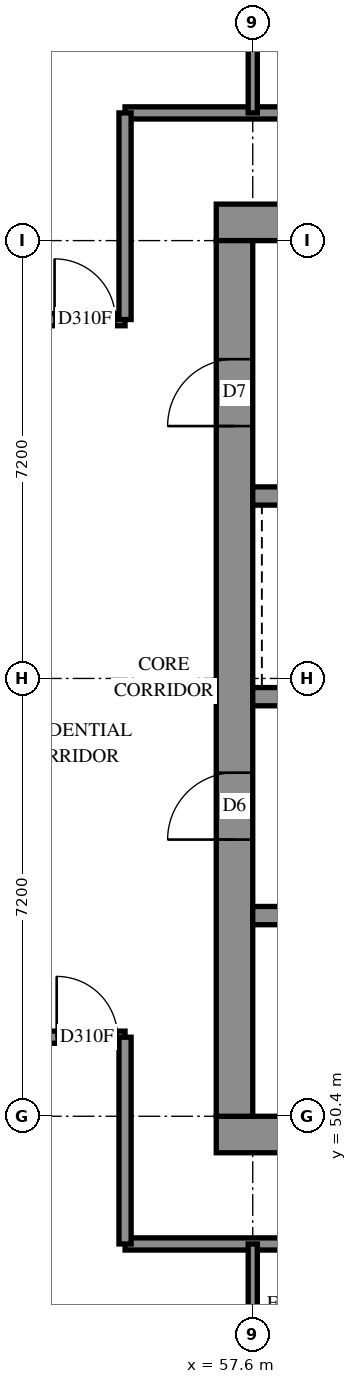
"""IFC4 building model, lengths in metres.
Left out: names, types, materials, properties, quantities, classifications, styles, units other than length and angle.
Written with IfcOpenShell. Run it as: python <this file> out.ifc"""

import sys

from ifc_helpers import new_model, si_unit, direction, frame, frame_2d, origin, place, context, subcontext, project, spatial, rectangle, extrude, element, fill, save


model = new_model("IFC4")
c1 = context("Model", 3, precision=1e-05, world=origin(), true_north=direction((0.0, 1.0)))
c2 = subcontext(c1, "Body", "Model", "MODEL_VIEW")
j1 = project(units=[si_unit("LENGTHUNIT", "METRE"), si_unit("PLANEANGLEUNIT", "RADIAN")], contexts=[c1])
p1 = place(None, origin())
s1 = spatial("IfcSite", under=j1, at=p1, CompositionType="ELEMENT")
p2 = place(p1, origin())
s2 = spatial("IfcBuilding", under=s1, at=p2, CompositionType="ELEMENT")
p3 = place(p2, frame((0.0, 0.0, 149.0)))
s3 = spatial("IfcBuildingStorey", under=s2, at=p3, CompositionType="ELEMENT", Elevation=149.0)
p4 = place(p3, frame((57.0, 50.1, -0.3), z_axis=(0.0, 0.0, 1.0), x_axis=(1.0, 0.0, 0.0)))
e1 = element("IfcWall", 1, at=p4, inside=s3, PredefinedType="SHEAR", context=c2, shape_type="SweptSolid", body=[
    extrude(rectangle(XDim=15.6, YDim=0.6, at=frame_2d((7.8, 0.0))), origin(), (0.0, 0.0, 1.0), 2.7),
])
p5 = place(p3, frame((57.0, 65.1, -0.3), z_axis=(0.0, 0.0, 1.0), x_axis=(1.0, 0.0, 0.0)))
e2 = element("IfcWall", 2, at=p5, inside=s3, PredefinedType="SHEAR", context=c2, shape_type="SweptSolid", body=[
    extrude(rectangle(XDim=15.6, YDim=0.6, at=frame_2d((7.8, 0.0))), origin(), (0.0, 0.0, 1.0), 2.7),
])
p6 = place(p5, frame((10.6, 0.0, 0.3)))
e3 = element("IfcOpeningElement", 3, at=p6, cuts=e2, PredefinedType="OPENING", context=c2, shape_type="SweptSolid", body=[
    extrude(rectangle(XDim=0.8, YDim=2.1, at=frame_2d((0.4, 1.05))), frame((0.0, 0.31, 0.0), z_axis=(0.0, -1.0, 0.0), x_axis=(1.0, 0.0, 0.0)), (0.0, 0.0, 1.0), 0.62),
])
p7 = place(p3, frame((57.3, 50.4, -0.3), z_axis=(0.0, 0.0, 1.0), x_axis=(0.0, 1.0, 0.0)))
e4 = element("IfcWall", 4, at=p7, inside=s3, PredefinedType="SHEAR", context=c2, shape_type="SweptSolid", body=[
    extrude(rectangle(XDim=14.4, YDim=0.6, at=frame_2d((7.2, 0.0))), origin(), (0.0, 0.0, 1.0), 2.7),
])
p8 = place(p7, frame((4.55, 0.0, 0.3)))
e5 = element("IfcOpeningElement", 5, at=p8, cuts=e4, PredefinedType="OPENING", context=c2, shape_type="SweptSolid", body=[
    extrude(rectangle(XDim=1.1, YDim=2.1, at=frame_2d((0.55, 1.05))), frame((0.0, 0.31, 0.0), z_axis=(0.0, -1.0, 0.0), x_axis=(1.0, 0.0, 0.0)), (0.0, 0.0, 1.0), 0.62),
])
p9 = place(p7, frame((11.35, 0.0, 0.3)))
e6 = element("IfcOpeningElement", 6, at=p9, cuts=e4, PredefinedType="OPENING", context=c2, shape_type="SweptSolid", body=[
    extrude(rectangle(XDim=1.1, YDim=2.1, at=frame_2d((0.55, 1.05))), frame((0.0, 0.31, 0.0), z_axis=(0.0, -1.0, 0.0), x_axis=(1.0, 0.0, 0.0)), (0.0, 0.0, 1.0), 0.62),
])
p10 = place(p3, frame((57.6, 53.7, 0.0), z_axis=(0.0, 0.0, 1.0), x_axis=(1.0, 0.0, 0.0)))
e7 = element("IfcWall", 7, at=p10, inside=s3, PredefinedType="SOLIDWALL", context=c2, shape_type="SweptSolid", body=[
    extrude(rectangle(XDim=14.4, YDim=0.3, at=frame_2d((7.2, 0.0))), origin(), (0.0, 0.0, 1.0), 3.1),
])
p11 = place(p10, frame((1.35, 0.0, 0.0)))
e8 = element("IfcOpeningElement", 8, at=p11, cuts=e7, PredefinedType="OPENING", context=c2, shape_type="SweptSolid", body=[
    extrude(rectangle(XDim=0.9, YDim=2.1, at=frame_2d((0.45, 1.05))), frame((0.0, 0.16, 0.0), z_axis=(0.0, -1.0, 0.0), x_axis=(1.0, 0.0, 0.0)), (0.0, 0.0, 1.0), 0.32),
])
p12 = place(p10, frame((4.95, 0.0, 0.0)))
e9 = element("IfcOpeningElement", 9, at=p12, cuts=e7, PredefinedType="OPENING", context=c2, shape_type="SweptSolid", body=[
    extrude(rectangle(XDim=0.9, YDim=2.1, at=frame_2d((0.45, 1.05))), frame((0.0, 0.16, 0.0), z_axis=(0.0, -1.0, 0.0), x_axis=(1.0, 0.0, 0.0)), (0.0, 0.0, 1.0), 0.32),
])
p13 = place(p10, frame((8.55, 0.0, 0.0)))
e10 = element("IfcOpeningElement", 10, at=p13, cuts=e7, PredefinedType="OPENING", context=c2, shape_type="SweptSolid", body=[
    extrude(rectangle(XDim=0.9, YDim=2.1, at=frame_2d((0.45, 1.05))), frame((0.0, 0.16, 0.0), z_axis=(0.0, -1.0, 0.0), x_axis=(1.0, 0.0, 0.0)), (0.0, 0.0, 1.0), 0.32),
])
p14 = place(p10, frame((12.05, 0.0, 0.0)))
e11 = element("IfcOpeningElement", 11, at=p14, cuts=e7, PredefinedType="OPENING", context=c2, shape_type="SweptSolid", body=[
    extrude(rectangle(XDim=1.1, YDim=2.1, at=frame_2d((0.55, 1.05))), frame((0.0, 0.16, 0.0), z_axis=(0.0, -1.0, 0.0), x_axis=(1.0, 0.0, 0.0)), (0.0, 0.0, 1.0), 0.32),
])
p15 = place(p3, frame((57.6, 57.3, 0.0), z_axis=(0.0, 0.0, 1.0), x_axis=(1.0, 0.0, 0.0)))
e12 = element("IfcWall", 12, at=p15, inside=s3, PredefinedType="SOLIDWALL", context=c2, shape_type="SweptSolid", body=[
    extrude(rectangle(XDim=14.4, YDim=0.3, at=frame_2d((7.2, 0.0))), origin(), (0.0, 0.0, 1.0), 3.1),
])
p16 = place(p15, frame((1.25, 0.0, 0.0)))
e13 = element("IfcOpeningElement", 13, at=p16, cuts=e12, PredefinedType="OPENING", context=c2, shape_type="SweptSolid", body=[
    extrude(rectangle(XDim=1.1, YDim=2.1, at=frame_2d((0.55, 1.05))), frame((0.0, 0.16, 0.0), z_axis=(0.0, -1.0, 0.0), x_axis=(1.0, 0.0, 0.0)), (0.0, 0.0, 1.0), 0.32),
])
p17 = place(p15, frame((4.85, 0.0, 0.0)))
e14 = element("IfcOpeningElement", 14, at=p17, cuts=e12, PredefinedType="OPENING", context=c2, shape_type="SweptSolid", body=[
    extrude(rectangle(XDim=1.1, YDim=2.1, at=frame_2d((0.55, 1.05))), frame((0.0, 0.16, 0.0), z_axis=(0.0, -1.0, 0.0), x_axis=(1.0, 0.0, 0.0)), (0.0, 0.0, 1.0), 0.32),
])
p18 = place(p15, frame((8.45, 0.0, 0.0)))
e15 = element("IfcOpeningElement", 15, at=p18, cuts=e12, PredefinedType="OPENING", context=c2, shape_type="SweptSolid", body=[
    extrude(rectangle(XDim=1.1, YDim=2.1, at=frame_2d((0.55, 1.05))), frame((0.0, 0.16, 0.0), z_axis=(0.0, -1.0, 0.0), x_axis=(1.0, 0.0, 0.0)), (0.0, 0.0, 1.0), 0.32),
])
p19 = place(p15, frame((12.05, 0.0, 0.0)))
e16 = element("IfcOpeningElement", 16, at=p19, cuts=e12, PredefinedType="OPENING", context=c2, shape_type="SweptSolid", body=[
    extrude(rectangle(XDim=1.1, YDim=2.1, at=frame_2d((0.55, 1.05))), frame((0.0, 0.16, 0.0), z_axis=(0.0, -1.0, 0.0), x_axis=(1.0, 0.0, 0.0)), (0.0, 0.0, 1.0), 0.32),
])
p20 = place(p3, frame((57.6, 60.6, 0.0), z_axis=(0.0, 0.0, 1.0), x_axis=(1.0, 0.0, 0.0)))
e17 = element("IfcWall", 17, at=p20, inside=s3, PredefinedType="SOLIDWALL", context=c2, shape_type="SweptSolid", body=[
    extrude(rectangle(XDim=7.2, YDim=0.3, at=frame_2d((3.6, 0.0))), origin(), (0.0, 0.0, 1.0), 3.1),
])
p21 = place(p3, frame((55.5, 48.3, 0.0), z_axis=(0.0, 0.0, 1.0), x_axis=(1.0, 0.0, 0.0)))
e18 = element("IfcWall", 18, at=p21, inside=s3, PredefinedType="PARTITIONING", context=c2, shape_type="SweptSolid", body=[
    extrude(rectangle(XDim=18.974, YDim=0.2, at=frame_2d((9.487, 0.0))), origin(), (0.0, 0.0, 1.0), 3.1),
])
p22 = place(p21, frame((4.4, 0.0, 0.0)))
e19 = element("IfcOpeningElement", 19, at=p22, cuts=e18, PredefinedType="OPENING", context=c2, shape_type="SweptSolid", body=[
    extrude(rectangle(XDim=0.9, YDim=2.1, at=frame_2d((0.45, 1.05))), frame((0.0, 0.11, 0.0), z_axis=(0.0, -1.0, 0.0), x_axis=(1.0, 0.0, 0.0)), (0.0, 0.0, 1.0), 0.22),
])
p23 = place(p21, frame((6.1, 0.0, 0.0)))
e20 = element("IfcOpeningElement", 20, at=p23, cuts=e18, PredefinedType="OPENING", context=c2, shape_type="SweptSolid", body=[
    extrude(rectangle(XDim=0.9, YDim=2.1, at=frame_2d((0.45, 1.05))), frame((0.0, 0.11, 0.0), z_axis=(0.0, -1.0, 0.0), x_axis=(1.0, 0.0, 0.0)), (0.0, 0.0, 1.0), 0.22),
])
p24 = place(p21, frame((13.162, 0.0, 0.0)))
e21 = element("IfcOpeningElement", 21, at=p24, cuts=e18, PredefinedType="OPENING", context=c2, shape_type="SweptSolid", body=[
    extrude(rectangle(XDim=1.0, YDim=2.1, at=frame_2d((0.5, 1.05))), frame((0.0, 0.11, 0.0), z_axis=(0.0, -1.0, 0.0), x_axis=(1.0, 0.0, 0.0)), (0.0, 0.0, 1.0), 0.22),
])
p25 = place(p3, frame((55.5, 66.9, 0.0), z_axis=(0.0, 0.0, 1.0), x_axis=(1.0, 0.0, 0.0)))
e22 = element("IfcWall", 22, at=p25, inside=s3, PredefinedType="PARTITIONING", context=c2, shape_type="SweptSolid", body=[
    extrude(rectangle(XDim=18.6, YDim=0.2, at=frame_2d((9.3, 0.0))), origin(), (0.0, 0.0, 1.0), 3.1),
])
p26 = place(p25, frame((4.4, 0.0, 0.0)))
e23 = element("IfcOpeningElement", 23, at=p26, cuts=e22, PredefinedType="OPENING", context=c2, shape_type="SweptSolid", body=[
    extrude(rectangle(XDim=0.9, YDim=2.1, at=frame_2d((0.45, 1.05))), frame((0.0, 0.11, 0.0), z_axis=(0.0, -1.0, 0.0), x_axis=(1.0, 0.0, 0.0)), (0.0, 0.0, 1.0), 0.22),
])
p27 = place(p25, frame((6.1, 0.0, 0.0)))
e24 = element("IfcOpeningElement", 24, at=p27, cuts=e22, PredefinedType="OPENING", context=c2, shape_type="SweptSolid", body=[
    extrude(rectangle(XDim=0.9, YDim=2.1, at=frame_2d((0.45, 1.05))), frame((0.0, 0.11, 0.0), z_axis=(0.0, -1.0, 0.0), x_axis=(1.0, 0.0, 0.0)), (0.0, 0.0, 1.0), 0.22),
])
p28 = place(p25, frame((11.65, 0.0, 0.0)))
e25 = element("IfcOpeningElement", 25, at=p28, cuts=e22, PredefinedType="OPENING", context=c2, shape_type="SweptSolid", body=[
    extrude(rectangle(XDim=0.9, YDim=2.1, at=frame_2d((0.45, 1.05))), frame((0.0, 0.11, 0.0), z_axis=(0.0, -1.0, 0.0), x_axis=(1.0, 0.0, 0.0)), (0.0, 0.0, 1.0), 0.22),
])
p29 = place(p25, frame((13.3, 0.0, 0.0)))
e26 = element("IfcOpeningElement", 26, at=p29, cuts=e22, PredefinedType="OPENING", context=c2, shape_type="SweptSolid", body=[
    extrude(rectangle(XDim=0.9, YDim=2.1, at=frame_2d((0.45, 1.05))), frame((0.0, 0.11, 0.0), z_axis=(0.0, -1.0, 0.0), x_axis=(1.0, 0.0, 0.0)), (0.0, 0.0, 1.0), 0.22),
])
p30 = place(p3, frame((50.4, 51.7, 0.0), z_axis=(0.0, 0.0, 1.0), x_axis=(1.0, 0.0, 0.0)))
e27 = element("IfcWall", 27, at=p30, inside=s3, PredefinedType="PARTITIONING", context=c2, shape_type="SweptSolid", body=[
    extrude(rectangle(XDim=5.1, YDim=0.2, at=frame_2d((2.55, 0.0))), origin(), (0.0, 0.0, 1.0), 3.1),
])
p31 = place(p30, frame((0.552, 0.0, 0.0)))
e28 = element("IfcOpeningElement", 28, at=p31, cuts=e27, PredefinedType="OPENING", context=c2, shape_type="SweptSolid", body=[
    extrude(rectangle(XDim=0.9, YDim=2.1, at=frame_2d((0.45, 1.05))), frame((0.0, 0.11, 0.0), z_axis=(0.0, -1.0, 0.0), x_axis=(1.0, 0.0, 0.0)), (0.0, 0.0, 1.0), 0.22),
])
p32 = place(p30, frame((3.976, 0.0, 0.0)))
e29 = element("IfcOpeningElement", 29, at=p32, cuts=e27, PredefinedType="OPENING", context=c2, shape_type="SweptSolid", body=[
    extrude(rectangle(XDim=1.0, YDim=2.1, at=frame_2d((0.5, 1.05))), frame((0.0, 0.11, 0.0), z_axis=(0.0, -1.0, 0.0), x_axis=(1.0, 0.0, 0.0)), (0.0, 0.0, 1.0), 0.22),
])
p33 = place(p3, frame((50.4, 63.5, 0.0), z_axis=(0.0, 0.0, 1.0), x_axis=(1.0, 0.0, 0.0)))
e30 = element("IfcWall", 30, at=p33, inside=s3, PredefinedType="PARTITIONING", context=c2, shape_type="SweptSolid", body=[
    extrude(rectangle(XDim=5.1, YDim=0.2, at=frame_2d((2.55, 0.0))), origin(), (0.0, 0.0, 1.0), 3.1),
])
p34 = place(p33, frame((0.552, 0.0, 0.0)))
e31 = element("IfcOpeningElement", 31, at=p34, cuts=e30, PredefinedType="OPENING", context=c2, shape_type="SweptSolid", body=[
    extrude(rectangle(XDim=0.9, YDim=2.1, at=frame_2d((0.45, 1.05))), frame((0.0, 0.11, 0.0), z_axis=(0.0, -1.0, 0.0), x_axis=(1.0, 0.0, 0.0)), (0.0, 0.0, 1.0), 0.22),
])
p35 = place(p33, frame((3.941, 0.0, 0.0)))
e32 = element("IfcOpeningElement", 32, at=p35, cuts=e30, PredefinedType="OPENING", context=c2, shape_type="SweptSolid", body=[
    extrude(rectangle(XDim=1.0, YDim=2.1, at=frame_2d((0.5, 1.05))), frame((0.0, 0.11, 0.0), z_axis=(0.0, -1.0, 0.0), x_axis=(1.0, 0.0, 0.0)), (0.0, 0.0, 1.0), 0.22),
])
p36 = place(p3, frame((55.5, 48.3, 0.0), z_axis=(0.0, 0.0, 1.0), x_axis=(0.0, 1.0, 0.0)))
e33 = element("IfcWall", 33, at=p36, inside=s3, PredefinedType="PARTITIONING", context=c2, shape_type="SweptSolid", body=[
    extrude(rectangle(XDim=3.4, YDim=0.2, at=frame_2d((1.7, 0.0))), origin(), (0.0, 0.0, 1.0), 3.1),
])
p37 = place(p3, frame((55.5, 63.502, 0.0), z_axis=(0.0, 0.0, 1.0), x_axis=(0.0, 1.0, 0.0)))
e34 = element("IfcWall", 34, at=p37, inside=s3, PredefinedType="PARTITIONING", context=c2, shape_type="SweptSolid", body=[
    extrude(rectangle(XDim=3.398, YDim=0.2, at=frame_2d((1.699, 0.0))), origin(), (0.0, 0.0, 1.0), 3.1),
])
for number, where, z_axis, x_axis in (
    (35, (57.6, 45.9, 0.0), (0.0, 0.0, 1.0), (0.0, 1.0, 0.0)),
    (36, (57.6, 66.9, 0.0), (0.0, 0.0, 1.0), (0.0, 1.0, 0.0)),
):
    element("IfcWall", number, at=place(p3, frame(where, z_axis=z_axis, x_axis=x_axis)), inside=s3, PredefinedType="PARTITIONING", context=c2, shape_type="SweptSolid", body=[
        extrude(rectangle(XDim=2.4, YDim=0.15, at=frame_2d((1.2, 0.0))), origin(), (0.0, 0.0, 1.0), 3.1),
    ])
p38 = place(p8, origin())
e37 = element("IfcDoor", 37, at=p38, inside=s3, OperationType="DOUBLE_DOOR_SINGLE_SWING", PredefinedType="DOOR", context=c2, shape_type="SweptSolid", body=[
    extrude(rectangle(XDim=1.1, YDim=2.1, at=frame_2d((0.55, 1.05))), frame((0.0, 0.025, 0.0), z_axis=(0.0, -1.0, 0.0), x_axis=(1.0, 0.0, 0.0)), (0.0, 0.0, 1.0), 0.05),
])
fill(e5, e37)
p39 = place(p9, origin())
e38 = element("IfcDoor", 38, at=p39, inside=s3, OperationType="SINGLE_SWING_LEFT", PredefinedType="DOOR", context=c2, shape_type="SweptSolid", body=[
    extrude(rectangle(XDim=1.1, YDim=2.1, at=frame_2d((0.55, 1.05))), frame((0.0, 0.025, 0.0), z_axis=(0.0, -1.0, 0.0), x_axis=(1.0, 0.0, 0.0)), (0.0, 0.0, 1.0), 0.05),
])
fill(e6, e38)
p40 = place(p35, origin())
e39 = element("IfcDoor", 39, at=p40, inside=s3, OperationType="SINGLE_SWING_LEFT", PredefinedType="DOOR", context=c2, shape_type="SweptSolid", body=[
    extrude(rectangle(XDim=1.0, YDim=2.1, at=frame_2d((0.5, 1.05))), frame((0.0, 0.025, 0.0), z_axis=(0.0, -1.0, 0.0), x_axis=(1.0, 0.0, 0.0)), (0.0, 0.0, 1.0), 0.05),
])
fill(e32, e39)
p41 = place(p32, origin())
e40 = element("IfcDoor", 40, at=p41, inside=s3, OperationType="SINGLE_SWING_RIGHT", PredefinedType="DOOR", context=c2, shape_type="SweptSolid", body=[
    extrude(rectangle(XDim=1.0, YDim=2.1, at=frame_2d((0.5, 1.05))), frame((0.0, 0.025, 0.0), z_axis=(0.0, -1.0, 0.0), x_axis=(1.0, 0.0, 0.0)), (0.0, 0.0, 1.0), 0.05),
])
fill(e29, e40)
save(model, sys.argv[1])
